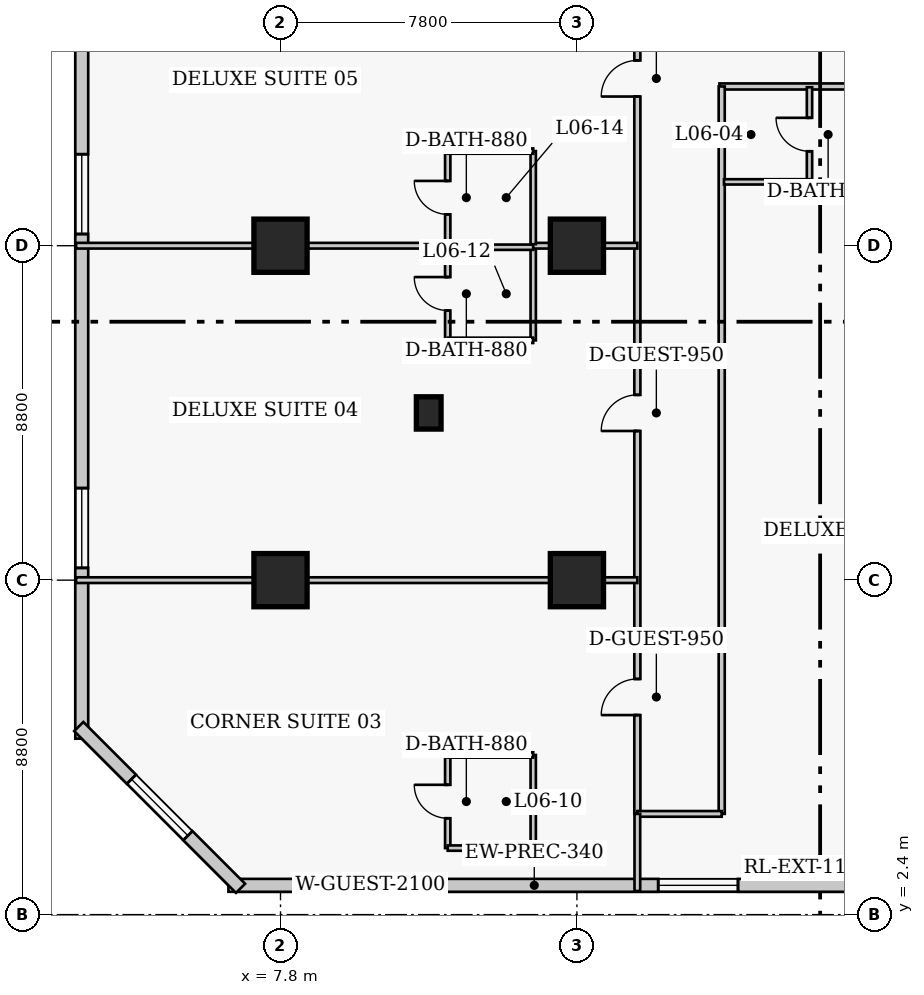
"""IFC4 building model, lengths in metres.
Left out: names, types, materials, properties, quantities, classifications, styles, units other than length and angle.
Written with IfcOpenShell. Run it as: python <this file> out.ifc"""

import sys

from ifc_helpers import new_model, si_unit, direction, frame, frame_2d, origin, origin_2d, place, context, subcontext, project, spatial, rectangle, extrude, element, fill, save


model = new_model("IFC4")
c1 = context("Model", 3, precision=1e-05, world=origin(), true_north=direction((0.0, 1.0)))
c2 = subcontext(c1, "Body", "Model", "MODEL_VIEW")
j1 = project(units=[si_unit("LENGTHUNIT", "METRE"), si_unit("PLANEANGLEUNIT", "RADIAN")], contexts=[c1])
p1 = place(None, origin())
s1 = spatial("IfcSite", under=j1, at=p1, CompositionType="ELEMENT")
p2 = place(p1, origin())
s2 = spatial("IfcBuilding", under=s1, at=p2, CompositionType="ELEMENT")
p3 = place(p2, frame((0.0, 0.0, 29.8)))
s3 = spatial("IfcBuildingStorey", under=s2, at=p3, CompositionType="ELEMENT", Elevation=29.8)
for number, where, z_axis, x_axis in (
    (1, (7.8, 11.2, 0.0), (0.0, 0.0, 1.0), (1.0, 0.0, 0.0)),
    (2, (7.8, 20.0, 0.0), (0.0, 0.0, 1.0), (1.0, 0.0, 0.0)),
    (3, (15.6, 11.2, 0.0), (0.0, 0.0, 1.0), (1.0, 0.0, 0.0)),
    (4, (15.6, 20.0, 0.0), (0.0, 0.0, 1.0), (1.0, 0.0, 0.0)),
):
    element("IfcColumn", number, at=place(p3, frame(where, z_axis=z_axis, x_axis=x_axis)), inside=s3, PredefinedType="COLUMN", context=c2, shape_type="SweptSolid", body=[
        extrude(rectangle(XDim=1.4, YDim=1.4, at=origin_2d()), origin(), (0.0, 0.0, 1.0), 3.8),
    ])
p4 = place(p3, frame((11.7, 15.6, 0.0), z_axis=(0.0, 0.0, 1.0), x_axis=(1.0, 0.0, 0.0)))
e5 = element("IfcColumn", 5, at=p4, inside=s3, PredefinedType="PILASTER", context=c2, shape_type="SweptSolid", body=[
    extrude(rectangle(XDim=0.65, YDim=0.85, at=origin_2d()), origin(), (0.0, 0.0, 1.0), 3.8),
])
p5 = place(p3, frame((6.43, 3.17, 0.0), z_axis=(0.0, 0.0, 1.0), x_axis=(1.0, 0.0, 0.0)))
e6 = element("IfcWall", 6, at=p5, inside=s3, PredefinedType="SOLIDWALL", context=c2, shape_type="SweptSolid", body=[
    extrude(rectangle(XDim=29.89, YDim=0.34, at=frame_2d((14.945, 0.0))), origin(), (0.0, 0.0, 1.0), 3.54),
])
p6 = place(p5, frame((20.92, 0.0, 0.0)))
e7 = element("IfcOpeningElement", 7, at=p6, cuts=e6, PredefinedType="OPENING", context=c2, shape_type="SweptSolid", body=[
    extrude(rectangle(XDim=1.4, YDim=2.15, at=frame_2d((0.7, 1.075))), frame((0.0, 0.18, 0.0), z_axis=(0.0, -1.0, 0.0), x_axis=(1.0, 0.0, 0.0)), (0.0, 0.0, 1.0), 0.36),
])
p7 = place(p5, frame((2.686, 0.0, 0.85)))
e8 = element("IfcOpeningElement", 8, at=p7, cuts=e6, PredefinedType="OPENING", context=c2, shape_type="SweptSolid", body=[
    extrude(rectangle(XDim=2.1, YDim=1.85, at=frame_2d((1.05, 0.925))), frame((0.0, 0.18, 0.0), z_axis=(0.0, -1.0, 0.0), x_axis=(1.0, 0.0, 0.0)), (0.0, 0.0, 1.0), 0.36),
])
p8 = place(p5, frame((11.309, 0.0, 0.85)))
e9 = element("IfcOpeningElement", 9, at=p8, cuts=e6, PredefinedType="OPENING", context=c2, shape_type="SweptSolid", body=[
    extrude(rectangle(XDim=2.1, YDim=1.85, at=frame_2d((1.05, 0.925))), frame((0.0, 0.18, 0.0), z_axis=(0.0, -1.0, 0.0), x_axis=(1.0, 0.0, 0.0)), (0.0, 0.0, 1.0), 0.36),
])
p9 = place(p5, frame((17.631, 0.0, 0.85)))
e10 = element("IfcOpeningElement", 10, at=p9, cuts=e6, PredefinedType="OPENING", context=c2, shape_type="SweptSolid", body=[
    extrude(rectangle(XDim=2.1, YDim=1.85, at=frame_2d((1.05, 0.925))), frame((0.0, 0.18, 0.0), z_axis=(0.0, -1.0, 0.0), x_axis=(1.0, 0.0, 0.0)), (0.0, 0.0, 1.0), 0.36),
])
p10 = place(p5, frame((25.104, 0.0, 0.85)))
e11 = element("IfcOpeningElement", 11, at=p10, cuts=e6, PredefinedType="OPENING", context=c2, shape_type="SweptSolid", body=[
    extrude(rectangle(XDim=2.1, YDim=1.85, at=frame_2d((1.05, 0.925))), frame((0.0, 0.18, 0.0), z_axis=(0.0, -1.0, 0.0), x_axis=(1.0, 0.0, 0.0)), (0.0, 0.0, 1.0), 0.36),
])
p11 = place(p3, frame((2.57, 42.17, 0.0), z_axis=(0.0, 0.0, 1.0), x_axis=(0.0, -1.0, 0.0)))
e12 = element("IfcWall", 12, at=p11, inside=s3, PredefinedType="SOLIDWALL", context=c2, shape_type="SweptSolid", body=[
    extrude(rectangle(XDim=35.14, YDim=0.34, at=frame_2d((17.57, 0.0))), origin(), (0.0, 0.0, 1.0), 3.54),
])
p12 = place(p11, frame((3.343, 0.0, 0.85)))
e13 = element("IfcOpeningElement", 13, at=p12, cuts=e12, PredefinedType="OPENING", context=c2, shape_type="SweptSolid", body=[
    extrude(rectangle(XDim=2.1, YDim=1.85, at=frame_2d((1.05, 0.925))), frame((0.0, 0.18, 0.0), z_axis=(0.0, -1.0, 0.0), x_axis=(1.0, 0.0, 0.0)), (0.0, 0.0, 1.0), 0.36),
])
p13 = place(p11, frame((10.978, 0.0, 0.85)))
e14 = element("IfcOpeningElement", 14, at=p13, cuts=e12, PredefinedType="OPENING", context=c2, shape_type="SweptSolid", body=[
    extrude(rectangle(XDim=2.1, YDim=1.85, at=frame_2d((1.05, 0.925))), frame((0.0, 0.18, 0.0), z_axis=(0.0, -1.0, 0.0), x_axis=(1.0, 0.0, 0.0)), (0.0, 0.0, 1.0), 0.36),
])
p14 = place(p11, frame((19.762, 0.0, 0.85)))
e15 = element("IfcOpeningElement", 15, at=p14, cuts=e12, PredefinedType="OPENING", context=c2, shape_type="SweptSolid", body=[
    extrude(rectangle(XDim=2.1, YDim=1.85, at=frame_2d((1.05, 0.925))), frame((0.0, 0.18, 0.0), z_axis=(0.0, -1.0, 0.0), x_axis=(1.0, 0.0, 0.0)), (0.0, 0.0, 1.0), 0.36),
])
p15 = place(p11, frame((28.548, 0.0, 0.85)))
e16 = element("IfcOpeningElement", 16, at=p15, cuts=e12, PredefinedType="OPENING", context=c2, shape_type="SweptSolid", body=[
    extrude(rectangle(XDim=2.1, YDim=1.85, at=frame_2d((1.05, 0.925))), frame((0.0, 0.18, 0.0), z_axis=(0.0, -1.0, 0.0), x_axis=(1.0, 0.0, 0.0)), (0.0, 0.0, 1.0), 0.36),
])
p16 = place(p3, frame((2.492, 7.348, 0.0), z_axis=(0.0, 0.0, 1.0), x_axis=(0.707106781187, -0.707106781187, 0.0)))
e17 = element("IfcWall", 17, at=p16, inside=s3, PredefinedType="SOLIDWALL", context=c2, shape_type="SweptSolid", body=[
    extrude(rectangle(XDim=6.02, YDim=0.34, at=frame_2d((3.01, 0.0))), origin(), (0.0, 0.0, 1.0), 3.54),
])
p17 = place(p16, frame((1.96, 0.0, 0.85)))
e18 = element("IfcOpeningElement", 18, at=p17, cuts=e17, PredefinedType="OPENING", context=c2, shape_type="SweptSolid", body=[
    extrude(rectangle(XDim=2.1, YDim=1.85, at=frame_2d((1.05, 0.925))), frame((0.0, 0.18, 0.0), z_axis=(0.0, -1.0, 0.0), x_axis=(1.0, 0.0, 0.0)), (0.0, 0.0, 1.0), 0.36),
])
p18 = place(p3, frame((19.35, 24.19, 0.0), z_axis=(0.0, 0.0, 1.0), x_axis=(1.0, 0.0, 0.0)))
e19 = element("IfcWall", 19, at=p18, inside=s3, PredefinedType="PARTITIONING", context=c2, shape_type="SweptSolid", body=[
    extrude(rectangle(XDim=16.45, YDim=0.16, at=frame_2d((8.225, 0.0))), origin(), (0.0, 0.0, 1.0), 3.54),
])
p19 = place(p18, frame((4.288, 0.0, 0.0)))
e20 = element("IfcOpeningElement", 20, at=p19, cuts=e19, PredefinedType="OPENING", context=c2, shape_type="SweptSolid", body=[
    extrude(rectangle(XDim=0.95, YDim=2.1, at=frame_2d((0.475, 1.05))), frame((0.0, 0.09, 0.0), z_axis=(0.0, -1.0, 0.0), x_axis=(1.0, 0.0, 0.0)), (0.0, 0.0, 1.0), 0.18),
])
p20 = place(p18, frame((11.302, 0.0, 0.0)))
e21 = element("IfcOpeningElement", 21, at=p20, cuts=e19, PredefinedType="OPENING", context=c2, shape_type="SweptSolid", body=[
    extrude(rectangle(XDim=1.0, YDim=2.15, at=frame_2d((0.5, 1.075))), frame((0.0, 0.09, 0.0), z_axis=(0.0, -1.0, 0.0), x_axis=(1.0, 0.0, 0.0)), (0.0, 0.0, 1.0), 0.18),
])
p21 = place(p3, frame((17.19, 5.05, 0.0), z_axis=(0.0, 0.0, 1.0), x_axis=(0.0, 1.0, 0.0)))
e22 = element("IfcWall", 22, at=p21, inside=s3, PredefinedType="PARTITIONING", context=c2, shape_type="SweptSolid", body=[
    extrude(rectangle(XDim=35.6, YDim=0.16, at=frame_2d((17.8, 0.0))), origin(), (0.0, 0.0, 1.0), 3.54),
])
p22 = place(p21, frame((2.6, 0.0, 0.0)))
e23 = element("IfcOpeningElement", 23, at=p22, cuts=e22, PredefinedType="OPENING", context=c2, shape_type="SweptSolid", body=[
    extrude(rectangle(XDim=0.95, YDim=2.1, at=frame_2d((0.475, 1.05))), frame((0.0, 0.09, 0.0), z_axis=(0.0, -1.0, 0.0), x_axis=(1.0, 0.0, 0.0)), (0.0, 0.0, 1.0), 0.18),
])
p23 = place(p21, frame((10.075, 0.0, 0.0)))
e24 = element("IfcOpeningElement", 24, at=p23, cuts=e22, PredefinedType="OPENING", context=c2, shape_type="SweptSolid", body=[
    extrude(rectangle(XDim=0.95, YDim=2.1, at=frame_2d((0.475, 1.05))), frame((0.0, 0.09, 0.0), z_axis=(0.0, -1.0, 0.0), x_axis=(1.0, 0.0, 0.0)), (0.0, 0.0, 1.0), 0.18),
])
p24 = place(p21, frame((18.875, 0.0, 0.0)))
e25 = element("IfcOpeningElement", 25, at=p24, cuts=e22, PredefinedType="OPENING", context=c2, shape_type="SweptSolid", body=[
    extrude(rectangle(XDim=0.95, YDim=2.1, at=frame_2d((0.475, 1.05))), frame((0.0, 0.09, 0.0), z_axis=(0.0, -1.0, 0.0), x_axis=(1.0, 0.0, 0.0)), (0.0, 0.0, 1.0), 0.18),
])
p25 = place(p21, frame((26.925, 0.0, 0.0)))
e26 = element("IfcOpeningElement", 26, at=p25, cuts=e22, PredefinedType="OPENING", context=c2, shape_type="SweptSolid", body=[
    extrude(rectangle(XDim=0.95, YDim=2.1, at=frame_2d((0.475, 1.05))), frame((0.0, 0.09, 0.0), z_axis=(0.0, -1.0, 0.0), x_axis=(1.0, 0.0, 0.0)), (0.0, 0.0, 1.0), 0.18),
])
p26 = place(p21, frame((34.16, 0.0, 0.0)))
e27 = element("IfcOpeningElement", 27, at=p26, cuts=e22, PredefinedType="OPENING", context=c2, shape_type="SweptSolid", body=[
    extrude(rectangle(XDim=1.0, YDim=2.15, at=frame_2d((0.5, 1.075))), frame((0.0, 0.09, 0.0), z_axis=(0.0, -1.0, 0.0), x_axis=(1.0, 0.0, 0.0)), (0.0, 0.0, 1.0), 0.18),
])
p27 = place(p3, frame((19.41, 5.05, 0.0), z_axis=(0.0, 0.0, 1.0), x_axis=(0.0, 1.0, 0.0)))
e28 = element("IfcWall", 28, at=p27, inside=s3, PredefinedType="PARTITIONING", context=c2, shape_type="SweptSolid", body=[
    extrude(rectangle(XDim=19.14, YDim=0.16, at=frame_2d((9.57, 0.0))), origin(), (0.0, 0.0, 1.0), 3.004),
])
p28 = place(p3, frame((17.19, 5.05, 0.0), z_axis=(0.0, 0.0, 1.0), x_axis=(1.0, 0.0, 0.0)))
e29 = element("IfcWall", 29, at=p28, inside=s3, PredefinedType="PARTITIONING", context=c2, shape_type="SweptSolid", body=[
    extrude(rectangle(XDim=2.22, YDim=0.15, at=frame_2d((1.11, 0.0))), origin(), (0.0, 0.0, 1.0), 3.54),
])
p29 = place(p3, frame((21.72, 21.68, 0.0), z_axis=(0.0, 0.0, 1.0), x_axis=(0.0, 1.0, 0.0)))
e30 = element("IfcWall", 30, at=p29, inside=s3, PredefinedType="PLUMBINGWALL", context=c2, shape_type="SweptSolid", body=[
    extrude(rectangle(XDim=2.49, YDim=0.14, at=frame_2d((1.245, 0.0))), origin(), (0.0, 0.0, 1.0), 3.54),
])
p30 = place(p29, frame((0.805, 0.0, 0.0)))
e31 = element("IfcOpeningElement", 31, at=p30, cuts=e30, PredefinedType="OPENING", context=c2, shape_type="SweptSolid", body=[
    extrude(rectangle(XDim=0.88, YDim=2.05, at=frame_2d((0.44, 1.025))), frame((0.0, 0.08, 0.0), z_axis=(0.0, -1.0, 0.0), x_axis=(1.0, 0.0, 0.0)), (0.0, 0.0, 1.0), 0.16),
])
p31 = place(p3, frame((19.47, 21.68, 0.0), z_axis=(0.0, 0.0, 1.0), x_axis=(1.0, 0.0, 0.0)))
e32 = element("IfcWall", 32, at=p31, inside=s3, PredefinedType="PLUMBINGWALL", context=c2, shape_type="SweptSolid", body=[
    extrude(rectangle(XDim=2.25, YDim=0.14, at=frame_2d((1.125, 0.0))), origin(), (0.0, 0.0, 1.0), 3.54),
])
p32 = place(p3, frame((17.19, 3.02, 0.0), z_axis=(0.0, 0.0, 1.0), x_axis=(0.0, 1.0, 0.0)))
e33 = element("IfcWall", 33, at=p32, inside=s3, PredefinedType="PARTITIONING", context=c2, shape_type="SweptSolid", body=[
    extrude(rectangle(XDim=2.03, YDim=0.15, at=frame_2d((1.015, 0.0))), origin(), (0.0, 0.0, 1.0), 3.54),
])
p33 = place(p3, frame((12.2, 4.15, 0.0), z_axis=(0.0, 0.0, 1.0), x_axis=(0.0, 1.0, 0.0)))
e34 = element("IfcWall", 34, at=p33, inside=s3, PredefinedType="PLUMBINGWALL", context=c2, shape_type="SweptSolid", body=[
    extrude(rectangle(XDim=2.45, YDim=0.14, at=frame_2d((1.225, 0.0))), origin(), (0.0, 0.0, 1.0), 3.54),
])
p34 = place(p33, frame((0.785, 0.0, 0.0)))
e35 = element("IfcOpeningElement", 35, at=p34, cuts=e34, PredefinedType="OPENING", context=c2, shape_type="SweptSolid", body=[
    extrude(rectangle(XDim=0.88, YDim=2.05, at=frame_2d((0.44, 1.025))), frame((0.0, 0.08, 0.0), z_axis=(0.0, -1.0, 0.0), x_axis=(1.0, 0.0, 0.0)), (0.0, 0.0, 1.0), 0.16),
])
p35 = place(p3, frame((14.45, 4.15, 0.0), z_axis=(0.0, 0.0, 1.0), x_axis=(0.0, 1.0, 0.0)))
e36 = element("IfcWall", 36, at=p35, inside=s3, PredefinedType="PLUMBINGWALL", context=c2, shape_type="SweptSolid", body=[
    extrude(rectangle(XDim=2.45, YDim=0.14, at=frame_2d((1.225, 0.0))), origin(), (0.0, 0.0, 1.0), 3.54),
])
for number, where, z_axis, x_axis in (
    (37, (12.2, 4.15, 0.0), (0.0, 0.0, 1.0), (1.0, 0.0, 0.0)),
    (38, (12.2, 6.6, 0.0), (0.0, 0.0, 1.0), (1.0, 0.0, 0.0)),
):
    element("IfcWall", number, at=place(p3, frame(where, z_axis=z_axis, x_axis=x_axis)), inside=s3, PredefinedType="PLUMBINGWALL", context=c2, shape_type="SweptSolid", body=[
        extrude(rectangle(XDim=2.25, YDim=0.14, at=frame_2d((1.125, 0.0))), origin(), (0.0, 0.0, 1.0), 3.54),
    ])
p36 = place(p3, frame((2.42, 11.2, 0.0), z_axis=(0.0, 0.0, 1.0), x_axis=(1.0, 0.0, 0.0)))
e39 = element("IfcWall", 39, at=p36, inside=s3, PredefinedType="PARTITIONING", context=c2, shape_type="SweptSolid", body=[
    extrude(rectangle(XDim=14.77, YDim=0.15, at=frame_2d((7.385, 0.0))), origin(), (0.0, 0.0, 1.0), 2.593),
])
p37 = place(p3, frame((12.2, 17.51, 0.0), z_axis=(0.0, 0.0, 1.0), x_axis=(0.0, 1.0, 0.0)))
e40 = element("IfcWall", 40, at=p37, inside=s3, PredefinedType="PLUMBINGWALL", context=c2, shape_type="SweptSolid", body=[
    extrude(rectangle(XDim=2.45, YDim=0.14, at=frame_2d((1.225, 0.0))), origin(), (0.0, 0.0, 1.0), 3.54),
])
p38 = place(p37, frame((0.785, 0.0, 0.0)))
e41 = element("IfcOpeningElement", 41, at=p38, cuts=e40, PredefinedType="OPENING", context=c2, shape_type="SweptSolid", body=[
    extrude(rectangle(XDim=0.88, YDim=2.05, at=frame_2d((0.44, 1.025))), frame((0.0, 0.08, 0.0), z_axis=(0.0, -1.0, 0.0), x_axis=(1.0, 0.0, 0.0)), (0.0, 0.0, 1.0), 0.16),
])
p39 = place(p3, frame((14.45, 17.51, 0.0), z_axis=(0.0, 0.0, 1.0), x_axis=(0.0, 1.0, 0.0)))
e42 = element("IfcWall", 42, at=p39, inside=s3, PredefinedType="PLUMBINGWALL", context=c2, shape_type="SweptSolid", body=[
    extrude(rectangle(XDim=2.45, YDim=0.14, at=frame_2d((1.225, 0.0))), origin(), (0.0, 0.0, 1.0), 3.54),
])
p40 = place(p3, frame((12.2, 17.51, 0.0), z_axis=(0.0, 0.0, 1.0), x_axis=(1.0, 0.0, 0.0)))
e43 = element("IfcWall", 43, at=p40, inside=s3, PredefinedType="PLUMBINGWALL", context=c2, shape_type="SweptSolid", body=[
    extrude(rectangle(XDim=2.25, YDim=0.14, at=frame_2d((1.125, 0.0))), origin(), (0.0, 0.0, 1.0), 3.54),
])
p41 = place(p3, frame((12.2, 19.96, 0.0), z_axis=(0.0, 0.0, 1.0), x_axis=(1.0, 0.0, 0.0)))
e44 = element("IfcWall", 44, at=p41, inside=s3, PredefinedType="PLUMBINGWALL", context=c2, shape_type="SweptSolid", body=[
    extrude(rectangle(XDim=2.25, YDim=0.14, at=frame_2d((1.125, 0.0))), origin(), (0.0, 0.0, 1.0), 2.593),
])
p42 = place(p3, frame((2.42, 20.0, 0.0), z_axis=(0.0, 0.0, 1.0), x_axis=(1.0, 0.0, 0.0)))
e45 = element("IfcWall", 45, at=p42, inside=s3, PredefinedType="PARTITIONING", context=c2, shape_type="SweptSolid", body=[
    extrude(rectangle(XDim=9.78, YDim=0.15, at=frame_2d((4.89, 0.0))), origin(), (0.0, 0.0, 1.0), 2.593),
])
p43 = place(p3, frame((14.45, 20.0, 0.0), z_axis=(0.0, 0.0, 1.0), x_axis=(1.0, 0.0, 0.0)))
e46 = element("IfcWall", 46, at=p43, inside=s3, PredefinedType="PARTITIONING", context=c2, shape_type="SweptSolid", body=[
    extrude(rectangle(XDim=2.74, YDim=0.15, at=frame_2d((1.37, 0.0))), origin(), (0.0, 0.0, 1.0), 2.593),
])
p44 = place(p3, frame((12.2, 20.04, 0.0), z_axis=(0.0, 0.0, 1.0), x_axis=(0.0, 1.0, 0.0)))
e47 = element("IfcWall", 47, at=p44, inside=s3, PredefinedType="PLUMBINGWALL", context=c2, shape_type="SweptSolid", body=[
    extrude(rectangle(XDim=2.45, YDim=0.14, at=frame_2d((1.225, 0.0))), origin(), (0.0, 0.0, 1.0), 3.54),
])
p45 = place(p44, frame((0.785, 0.0, 0.0)))
e48 = element("IfcOpeningElement", 48, at=p45, cuts=e47, PredefinedType="OPENING", context=c2, shape_type="SweptSolid", body=[
    extrude(rectangle(XDim=0.88, YDim=2.05, at=frame_2d((0.44, 1.025))), frame((0.0, 0.08, 0.0), z_axis=(0.0, -1.0, 0.0), x_axis=(1.0, 0.0, 0.0)), (0.0, 0.0, 1.0), 0.16),
])
p46 = place(p3, frame((14.45, 20.04, 0.0), z_axis=(0.0, 0.0, 1.0), x_axis=(0.0, 1.0, 0.0)))
e49 = element("IfcWall", 49, at=p46, inside=s3, PredefinedType="PLUMBINGWALL", context=c2, shape_type="SweptSolid", body=[
    extrude(rectangle(XDim=2.45, YDim=0.14, at=frame_2d((1.225, 0.0))), origin(), (0.0, 0.0, 1.0), 3.54),
])
p47 = place(p3, frame((12.2, 22.49, 0.0), z_axis=(0.0, 0.0, 1.0), x_axis=(1.0, 0.0, 0.0)))
e50 = element("IfcWall", 50, at=p47, inside=s3, PredefinedType="PLUMBINGWALL", context=c2, shape_type="SweptSolid", body=[
    extrude(rectangle(XDim=2.25, YDim=0.14, at=frame_2d((1.125, 0.0))), origin(), (0.0, 0.0, 1.0), 3.54),
])
p48 = place(p7, origin())
e51 = element("IfcWindow", 51, at=p48, inside=s3, PartitioningType="SINGLE_PANEL", PredefinedType="WINDOW", context=c2, shape_type="SweptSolid", body=[
    extrude(rectangle(XDim=2.1, YDim=1.85, at=frame_2d((1.05, 0.925))), frame((0.0, 0.03, 0.0), z_axis=(0.0, -1.0, 0.0), x_axis=(1.0, 0.0, 0.0)), (0.0, 0.0, 1.0), 0.06),
])
fill(e8, e51)
p49 = place(p8, origin())
e52 = element("IfcWindow", 52, at=p49, inside=s3, PartitioningType="SINGLE_PANEL", PredefinedType="WINDOW", context=c2, shape_type="SweptSolid", body=[
    extrude(rectangle(XDim=2.1, YDim=1.85, at=frame_2d((1.05, 0.925))), frame((0.0, 0.03, 0.0), z_axis=(0.0, -1.0, 0.0), x_axis=(1.0, 0.0, 0.0)), (0.0, 0.0, 1.0), 0.06),
])
fill(e9, e52)
p50 = place(p14, origin())
e53 = element("IfcWindow", 53, at=p50, inside=s3, PartitioningType="SINGLE_PANEL", PredefinedType="WINDOW", context=c2, shape_type="SweptSolid", body=[
    extrude(rectangle(XDim=2.1, YDim=1.85, at=frame_2d((1.05, 0.925))), frame((0.0, 0.03, 0.0), z_axis=(0.0, -1.0, 0.0), x_axis=(1.0, 0.0, 0.0)), (0.0, 0.0, 1.0), 0.06),
])
fill(e15, e53)
p51 = place(p15, origin())
e54 = element("IfcWindow", 54, at=p51, inside=s3, PartitioningType="SINGLE_PANEL", PredefinedType="WINDOW", context=c2, shape_type="SweptSolid", body=[
    extrude(rectangle(XDim=2.1, YDim=1.85, at=frame_2d((1.05, 0.925))), frame((0.0, 0.03, 0.0), z_axis=(0.0, -1.0, 0.0), x_axis=(1.0, 0.0, 0.0)), (0.0, 0.0, 1.0), 0.06),
])
fill(e16, e54)
p52 = place(p17, origin())
e55 = element("IfcWindow", 55, at=p52, inside=s3, PartitioningType="SINGLE_PANEL", PredefinedType="WINDOW", context=c2, shape_type="SweptSolid", body=[
    extrude(rectangle(XDim=2.1, YDim=1.85, at=frame_2d((1.05, 0.925))), frame((0.0, 0.03, 0.0), z_axis=(0.0, -1.0, 0.0), x_axis=(1.0, 0.0, 0.0)), (0.0, 0.0, 1.0), 0.06),
])
fill(e18, e55)
p53 = place(p30, origin())
e56 = element("IfcDoor", 56, at=p53, inside=s3, OperationType="SINGLE_SWING_RIGHT", PredefinedType="DOOR", context=c2, shape_type="SweptSolid", body=[
    extrude(rectangle(XDim=0.88, YDim=2.05, at=frame_2d((0.44, 1.025))), frame((0.0, 0.025, 0.0), z_axis=(0.0, -1.0, 0.0), x_axis=(1.0, 0.0, 0.0)), (0.0, 0.0, 1.0), 0.05),
])
fill(e31, e56)
p54 = place(p34, origin())
e57 = element("IfcDoor", 57, at=p54, inside=s3, OperationType="SINGLE_SWING_RIGHT", PredefinedType="DOOR", context=c2, shape_type="SweptSolid", body=[
    extrude(rectangle(XDim=0.88, YDim=2.05, at=frame_2d((0.44, 1.025))), frame((0.0, 0.025, 0.0), z_axis=(0.0, -1.0, 0.0), x_axis=(1.0, 0.0, 0.0)), (0.0, 0.0, 1.0), 0.05),
])
fill(e35, e57)
p55 = place(p22, origin())
e58 = element("IfcDoor", 58, at=p55, inside=s3, OperationType="SINGLE_SWING_LEFT", PredefinedType="DOOR", context=c2, shape_type="SweptSolid", body=[
    extrude(rectangle(XDim=0.95, YDim=2.1, at=frame_2d((0.475, 1.05))), frame((0.0, 0.025, 0.0), z_axis=(0.0, -1.0, 0.0), x_axis=(1.0, 0.0, 0.0)), (0.0, 0.0, 1.0), 0.05),
])
fill(e23, e58)
p56 = place(p38, origin())
e59 = element("IfcDoor", 59, at=p56, inside=s3, OperationType="SINGLE_SWING_RIGHT", PredefinedType="DOOR", context=c2, shape_type="SweptSolid", body=[
    extrude(rectangle(XDim=0.88, YDim=2.05, at=frame_2d((0.44, 1.025))), frame((0.0, 0.025, 0.0), z_axis=(0.0, -1.0, 0.0), x_axis=(1.0, 0.0, 0.0)), (0.0, 0.0, 1.0), 0.05),
])
fill(e41, e59)
p57 = place(p23, origin())
e60 = element("IfcDoor", 60, at=p57, inside=s3, OperationType="SINGLE_SWING_LEFT", PredefinedType="DOOR", context=c2, shape_type="SweptSolid", body=[
    extrude(rectangle(XDim=0.95, YDim=2.1, at=frame_2d((0.475, 1.05))), frame((0.0, 0.025, 0.0), z_axis=(0.0, -1.0, 0.0), x_axis=(1.0, 0.0, 0.0)), (0.0, 0.0, 1.0), 0.05),
])
fill(e24, e60)
p58 = place(p45, origin())
e61 = element("IfcDoor", 61, at=p58, inside=s3, OperationType="SINGLE_SWING_RIGHT", PredefinedType="DOOR", context=c2, shape_type="SweptSolid", body=[
    extrude(rectangle(XDim=0.88, YDim=2.05, at=frame_2d((0.44, 1.025))), frame((0.0, 0.025, 0.0), z_axis=(0.0, -1.0, 0.0), x_axis=(1.0, 0.0, 0.0)), (0.0, 0.0, 1.0), 0.05),
])
fill(e48, e61)
p59 = place(p24, origin())
e62 = element("IfcDoor", 62, at=p59, inside=s3, OperationType="SINGLE_SWING_LEFT", PredefinedType="DOOR", context=c2, shape_type="SweptSolid", body=[
    extrude(rectangle(XDim=0.95, YDim=2.1, at=frame_2d((0.475, 1.05))), frame((0.0, 0.025, 0.0), z_axis=(0.0, -1.0, 0.0), x_axis=(1.0, 0.0, 0.0)), (0.0, 0.0, 1.0), 0.05),
])
fill(e25, e62)
save(model, sys.argv[1])
